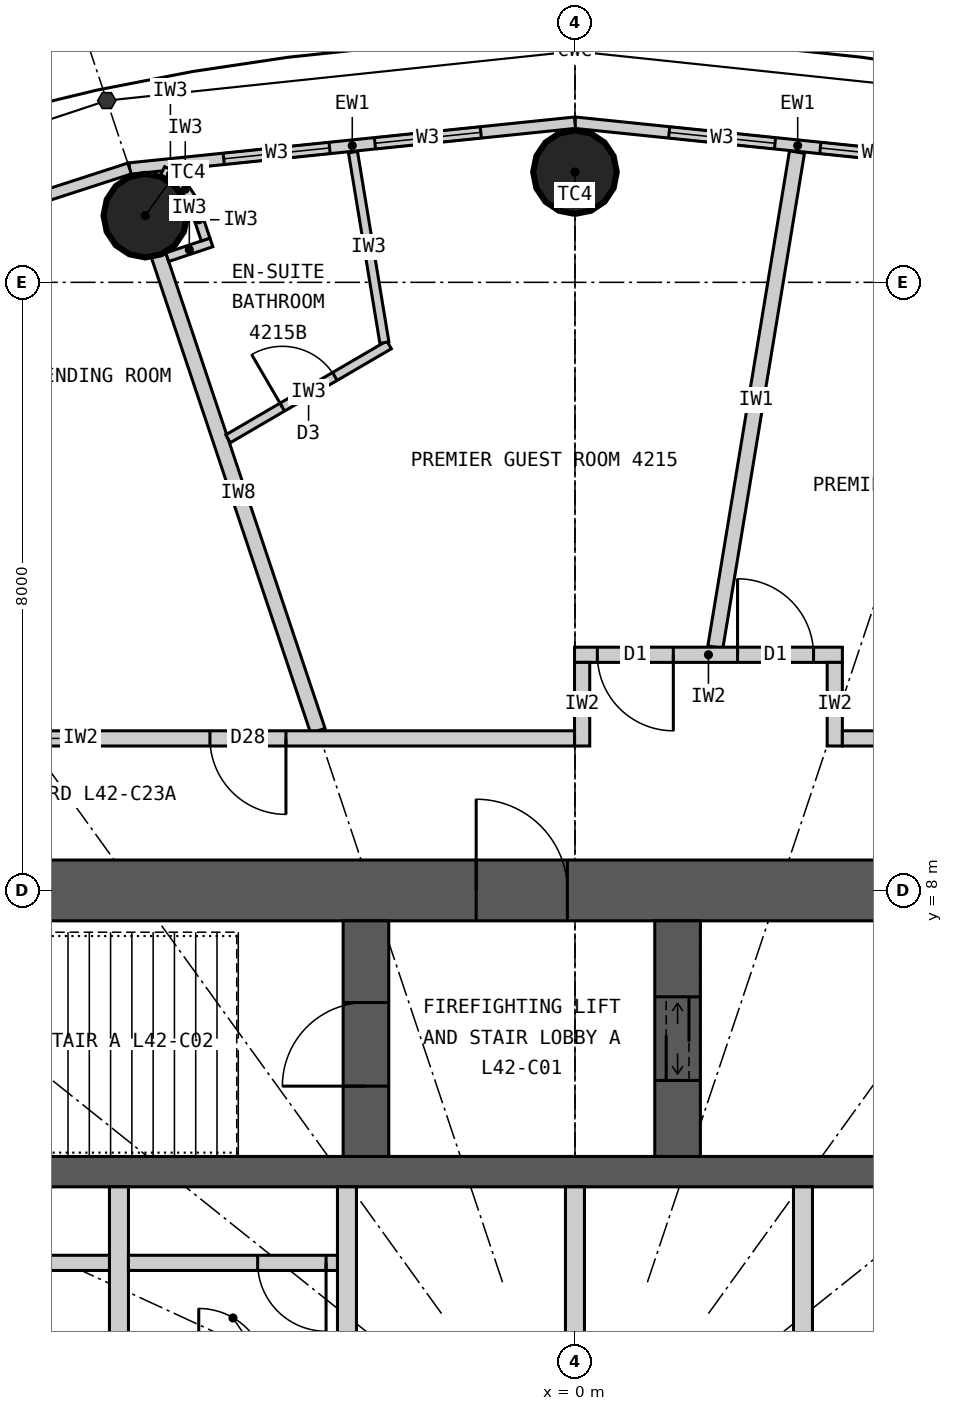
"""IFC4 building model, lengths in metres.
Left out: names, types, materials, properties, quantities, classifications, styles, units other than length and angle.
Written with IfcOpenShell. Run it as: python <this file> out.ifc"""

import sys

from ifc_helpers import new_model, si_unit, direction, frame, frame_2d, origin, origin_2d, place, context, subcontext, project, spatial, rectangle, circle, extrude, element, fill, save


model = new_model("IFC4")
c1 = context("Model", 3, precision=1e-05, world=origin(), true_north=direction((0.0, 1.0)))
c2 = subcontext(c1, "Body", "Model", "MODEL_VIEW")
j1 = project(units=[si_unit("LENGTHUNIT", "METRE"), si_unit("PLANEANGLEUNIT", "RADIAN")], contexts=[c1])
p1 = place(None, origin())
s1 = spatial("IfcSite", under=j1, at=p1, CompositionType="ELEMENT")
p2 = place(p1, origin())
s2 = spatial("IfcBuilding", under=s1, at=p2, CompositionType="ELEMENT")
p3 = place(p2, frame((0.0, 0.0, 159.9)))
s3 = spatial("IfcBuildingStorey", under=s2, at=p3, CompositionType="ELEMENT", Elevation=159.9)
for number, where, z_axis, x_axis in (
    (1, (0.0, 17.45, 0.0), (0.0, 0.0, 1.0), (1.0, 0.0, 0.0)),
    (2, (-5.653, 16.877, 0.0), (0.0, 0.0, 1.0), (1.0, 0.0, 0.0)),
):
    element("IfcColumn", number, at=place(p3, frame(where, z_axis=z_axis, x_axis=x_axis)), inside=s3, PredefinedType="COLUMN", context=c2, shape_type="SweptSolid", body=[
        extrude(circle(Radius=0.55, at=origin_2d()), origin(), (0.0, 0.0, 1.0), 3.3),
    ])
p4 = place(p3, frame((-12.4, 8.0, 0.0), z_axis=(0.0, 0.0, 1.0), x_axis=(1.0, 0.0, 0.0)))
e3 = element("IfcWall", 3, at=p4, inside=s3, PredefinedType="SHEAR", context=c2, shape_type="SweptSolid", body=[
    extrude(rectangle(XDim=24.8, YDim=0.8, at=frame_2d((12.4, 0.0))), origin(), (0.0, 0.0, 1.0), 3.3),
])
p5 = place(p4, frame((11.1, 0.0, 0.0)))
e4 = element("IfcOpeningElement", 4, at=p5, cuts=e3, PredefinedType="OPENING", context=c2, shape_type="SweptSolid", body=[
    extrude(rectangle(XDim=1.2, YDim=2.2, at=frame_2d((0.6, 1.1))), frame((0.0, 0.41, 0.0), z_axis=(0.0, -1.0, 0.0), x_axis=(1.0, 0.0, 0.0)), (0.0, 0.0, 1.0), 0.82),
])
p6 = place(p4, frame((18.7, 0.0, 0.0)))
e5 = element("IfcOpeningElement", 5, at=p6, cuts=e3, PredefinedType="OPENING", context=c2, shape_type="SweptSolid", body=[
    extrude(rectangle(XDim=0.9, YDim=2.2, at=frame_2d((0.45, 1.1))), frame((0.0, 0.41, 0.0), z_axis=(0.0, -1.0, 0.0), x_axis=(1.0, 0.0, 0.0)), (0.0, 0.0, 1.0), 0.82),
])
p7 = place(p3, frame((-11.6, 4.3, 0.0), z_axis=(0.0, 0.0, 1.0), x_axis=(1.0, 0.0, 0.0)))
e6 = element("IfcWall", 6, at=p7, inside=s3, PredefinedType="SHEAR", context=c2, shape_type="SweptSolid", body=[
    extrude(rectangle(XDim=23.2, YDim=0.4, at=frame_2d((11.6, 0.0))), origin(), (0.0, 0.0, 1.0), 3.3),
])
p8 = place(p3, frame((-2.75, 4.5, 0.0), z_axis=(0.0, 0.0, 1.0), x_axis=(0.0, 1.0, 0.0)))
e7 = element("IfcWall", 7, at=p8, inside=s3, PredefinedType="SHEAR", context=c2, shape_type="SweptSolid", body=[
    extrude(rectangle(XDim=3.1, YDim=0.6, at=frame_2d((1.55, 0.0))), origin(), (0.0, 0.0, 1.0), 3.3),
])
p9 = place(p8, frame((0.925, 0.0, 0.0)))
e8 = element("IfcOpeningElement", 8, at=p9, cuts=e7, PredefinedType="OPENING", context=c2, shape_type="SweptSolid", body=[
    extrude(rectangle(XDim=1.1, YDim=2.2, at=frame_2d((0.55, 1.1))), frame((0.0, 0.31, 0.0), z_axis=(0.0, -1.0, 0.0), x_axis=(1.0, 0.0, 0.0)), (0.0, 0.0, 1.0), 0.62),
])
p10 = place(p3, frame((1.35, 4.5, 0.0), z_axis=(0.0, 0.0, 1.0), x_axis=(0.0, 1.0, 0.0)))
e9 = element("IfcWall", 9, at=p10, inside=s3, PredefinedType="SHEAR", context=c2, shape_type="SweptSolid", body=[
    extrude(rectangle(XDim=3.1, YDim=0.6, at=frame_2d((1.55, 0.0))), origin(), (0.0, 0.0, 1.0), 3.3),
])
p11 = place(p10, frame((1.0, 0.0, 0.0)))
e10 = element("IfcOpeningElement", 10, at=p11, cuts=e9, PredefinedType="OPENING", context=c2, shape_type="SweptSolid", body=[
    extrude(rectangle(XDim=1.1, YDim=2.2, at=frame_2d((0.55, 1.1))), frame((0.0, 0.31, 0.0), z_axis=(0.0, -1.0, 0.0), x_axis=(1.0, 0.0, 0.0)), (0.0, 0.0, 1.0), 0.62),
])
for number, where, z_axis, x_axis in (
    (11, (-6.0, 1.75, 0.0), (0.0, 0.0, 1.0), (0.0, 1.0, 0.0)),
    (12, (-3.0, 1.75, 0.0), (0.0, 0.0, 1.0), (0.0, 1.0, 0.0)),
    (13, (0.0, 1.75, 0.0), (0.0, 0.0, 1.0), (0.0, 1.0, 0.0)),
    (14, (3.0, 1.75, 0.0), (0.0, 0.0, 1.0), (0.0, 1.0, 0.0)),
):
    element("IfcWall", number, at=place(p3, frame(where, z_axis=z_axis, x_axis=x_axis)), inside=s3, PredefinedType="PARTITIONING", context=c2, shape_type="SweptSolid", body=[
        extrude(rectangle(XDim=2.35, YDim=0.25, at=frame_2d((1.175, 0.0))), origin(), (0.0, 0.0, 1.0), 3.3),
    ])
p12 = place(p3, frame((5.86, 17.497, 0.0), z_axis=(0.0, 0.0, 1.0), x_axis=(-0.994751738032, 0.102318032045, 0.0)))
e15 = element("IfcWall", 15, at=p12, inside=s3, PredefinedType="ELEMENTEDWALL", context=c2, shape_type="SweptSolid", body=[
    extrude(rectangle(XDim=5.891, YDim=0.15, at=frame_2d((2.946, 0.0))), origin(), (0.0, 0.0, 1.0), 3.12),
])
p13 = place(p12, frame((1.246, 0.0, 0.9)))
e16 = element("IfcOpeningElement", 16, at=p13, cuts=e15, PredefinedType="OPENING", context=c2, shape_type="SweptSolid", body=[
    extrude(rectangle(XDim=1.4, YDim=1.9, at=frame_2d((0.7, 0.95))), frame((0.0, 0.085, 0.0), z_axis=(0.0, -1.0, 0.0), x_axis=(1.0, 0.0, 0.0)), (0.0, 0.0, 1.0), 0.17),
])
p14 = place(p12, frame((3.246, 0.0, 0.9)))
e17 = element("IfcOpeningElement", 17, at=p14, cuts=e15, PredefinedType="OPENING", context=c2, shape_type="SweptSolid", body=[
    extrude(rectangle(XDim=1.4, YDim=1.9, at=frame_2d((0.7, 0.95))), frame((0.0, 0.085, 0.0), z_axis=(0.0, -1.0, 0.0), x_axis=(1.0, 0.0, 0.0)), (0.0, 0.0, 1.0), 0.17),
])
p15 = place(p3, frame((0.0, 18.1, 0.0), z_axis=(0.0, 0.0, 1.0), x_axis=(-0.994751738032, -0.102318032045, 0.0)))
e18 = element("IfcWall", 18, at=p15, inside=s3, PredefinedType="ELEMENTEDWALL", context=c2, shape_type="SweptSolid", body=[
    extrude(rectangle(XDim=5.891, YDim=0.15, at=frame_2d((2.946, 0.0))), origin(), (0.0, 0.0, 1.0), 3.12),
])
p16 = place(p15, frame((1.246, 0.0, 0.9)))
e19 = element("IfcOpeningElement", 19, at=p16, cuts=e18, PredefinedType="OPENING", context=c2, shape_type="SweptSolid", body=[
    extrude(rectangle(XDim=1.4, YDim=1.9, at=frame_2d((0.7, 0.95))), frame((0.0, 0.085, 0.0), z_axis=(0.0, -1.0, 0.0), x_axis=(1.0, 0.0, 0.0)), (0.0, 0.0, 1.0), 0.17),
])
p17 = place(p15, frame((3.246, 0.0, 0.9)))
e20 = element("IfcOpeningElement", 20, at=p17, cuts=e18, PredefinedType="OPENING", context=c2, shape_type="SweptSolid", body=[
    extrude(rectangle(XDim=1.4, YDim=1.9, at=frame_2d((0.7, 0.95))), frame((0.0, 0.085, 0.0), z_axis=(0.0, -1.0, 0.0), x_axis=(1.0, 0.0, 0.0)), (0.0, 0.0, 1.0), 0.17),
])
p18 = place(p3, frame((-5.86, 17.497, 0.0), z_axis=(0.0, 0.0, 1.0), x_axis=(-0.951432482129, -0.307857486429, 0.0)))
e21 = element("IfcWall", 21, at=p18, inside=s3, PredefinedType="ELEMENTEDWALL", context=c2, shape_type="SweptSolid", body=[
    extrude(rectangle(XDim=5.766, YDim=0.15, at=frame_2d((2.883, 0.0))), origin(), (0.0, 0.0, 1.0), 3.12),
])
p19 = place(p18, frame((1.183, 0.0, 0.9)))
e22 = element("IfcOpeningElement", 22, at=p19, cuts=e21, PredefinedType="OPENING", context=c2, shape_type="SweptSolid", body=[
    extrude(rectangle(XDim=1.4, YDim=1.9, at=frame_2d((0.7, 0.95))), frame((0.0, 0.085, 0.0), z_axis=(0.0, -1.0, 0.0), x_axis=(1.0, 0.0, 0.0)), (0.0, 0.0, 1.0), 0.17),
])
p20 = place(p18, frame((3.183, 0.0, 0.9)))
e23 = element("IfcOpeningElement", 23, at=p20, cuts=e21, PredefinedType="OPENING", context=c2, shape_type="SweptSolid", body=[
    extrude(rectangle(XDim=1.4, YDim=1.9, at=frame_2d((0.7, 0.95))), frame((0.0, 0.085, 0.0), z_axis=(0.0, -1.0, 0.0), x_axis=(1.0, 0.0, 0.0)), (0.0, 0.0, 1.0), 0.17),
])
p21 = place(p3, frame((1.847, 11.2, 0.0), z_axis=(0.0, 0.0, 1.0), x_axis=(0.162695449404, 0.986676335352, 0.0)))
e24 = element("IfcWall", 24, at=p21, inside=s3, PredefinedType="PARTITIONING", context=c2, shape_type="SweptSolid", body=[
    extrude(rectangle(XDim=6.601, YDim=0.2, at=frame_2d((3.301, 0.0))), origin(), (0.0, 0.0, 1.0), 3.12),
])
p22 = place(p3, frame((-3.383, 10.1, 0.0), z_axis=(0.0, 0.0, 1.0), x_axis=(-0.317615120474, 0.948219718866, 0.0)))
e25 = element("IfcWall", 25, at=p22, inside=s3, PredefinedType="PARTITIONING", context=c2, shape_type="SweptSolid", body=[
    extrude(rectangle(XDim=6.597, YDim=0.2, at=frame_2d((3.299, 0.0))), origin(), (0.0, 0.0, 1.0), 2.42),
])
p23 = place(p3, frame((-0.006, 11.1, 0.0), z_axis=(0.0, 0.0, 1.0), x_axis=(1.0, 0.0, 0.0)))
e26 = element("IfcWall", 26, at=p23, inside=s3, PredefinedType="PARTITIONING", context=c2, shape_type="SweptSolid", body=[
    extrude(rectangle(XDim=3.524, YDim=0.2, at=frame_2d((1.762, 0.0))), origin(), (0.0, 0.0, 1.0), 3.12),
])
p24 = place(p23, frame((2.145, 0.0, 0.0)))
e27 = element("IfcOpeningElement", 27, at=p24, cuts=e26, PredefinedType="OPENING", context=c2, shape_type="SweptSolid", body=[
    extrude(rectangle(XDim=1.0, YDim=2.2, at=frame_2d((0.5, 1.1))), frame((0.0, 0.11, 0.0), z_axis=(0.0, -1.0, 0.0), x_axis=(1.0, 0.0, 0.0)), (0.0, 0.0, 1.0), 0.22),
])
p25 = place(p23, frame((0.3, 0.0, 0.0)))
e28 = element("IfcOpeningElement", 28, at=p25, cuts=e26, PredefinedType="OPENING", context=c2, shape_type="SweptSolid", body=[
    extrude(rectangle(XDim=1.0, YDim=2.2, at=frame_2d((0.5, 1.1))), frame((0.0, 0.11, 0.0), z_axis=(0.0, -1.0, 0.0), x_axis=(1.0, 0.0, 0.0)), (0.0, 0.0, 1.0), 0.22),
])
p26 = place(p3, frame((0.094, 9.9, 0.0), z_axis=(0.0, 0.0, 1.0), x_axis=(0.0, 1.0, 0.0)))
e29 = element("IfcWall", 29, at=p26, inside=s3, PredefinedType="PARTITIONING", context=c2, shape_type="SweptSolid", body=[
    extrude(rectangle(XDim=1.1, YDim=0.2, at=frame_2d((0.55, 0.0))), origin(), (0.0, 0.0, 1.0), 2.42),
])
p27 = place(p3, frame((3.418, 9.9, 0.0), z_axis=(0.0, 0.0, 1.0), x_axis=(0.0, 1.0, 0.0)))
e30 = element("IfcWall", 30, at=p27, inside=s3, PredefinedType="PARTITIONING", context=c2, shape_type="SweptSolid", body=[
    extrude(rectangle(XDim=1.1, YDim=0.2, at=frame_2d((0.55, 0.0))), origin(), (0.0, 0.0, 1.0), 3.12),
])
p28 = place(p3, frame((-4.564, 13.942, 0.0), z_axis=(0.0, 0.0, 1.0), x_axis=(0.863717519451, 0.503976236139, 0.0)))
e31 = element("IfcWall", 31, at=p28, inside=s3, PredefinedType="PARTITIONING", context=c2, shape_type="SweptSolid", body=[
    extrude(rectangle(XDim=2.453, YDim=0.12, at=frame_2d((1.226, 0.0))), origin(), (0.0, 0.0, 1.0), 3.12),
])
p29 = place(p28, frame((0.826, 0.0, 0.0)))
e32 = element("IfcOpeningElement", 32, at=p29, cuts=e31, PredefinedType="OPENING", context=c2, shape_type="SweptSolid", body=[
    extrude(rectangle(XDim=0.8, YDim=2.1, at=frame_2d((0.4, 1.05))), frame((0.0, 0.07, 0.0), z_axis=(0.0, -1.0, 0.0), x_axis=(1.0, 0.0, 0.0)), (0.0, 0.0, 1.0), 0.14),
])
p30 = place(p3, frame((-2.508, 15.207, 0.0), z_axis=(0.0, 0.0, 1.0), x_axis=(-0.162637365963, 0.986685911115, 0.0)))
e33 = element("IfcWall", 33, at=p30, inside=s3, PredefinedType="PARTITIONING", context=c2, shape_type="SweptSolid", body=[
    extrude(rectangle(XDim=2.54, YDim=0.12, at=frame_2d((1.27, 0.0))), origin(), (0.0, 0.0, 1.0), 3.12),
])
p31 = place(p3, frame((-5.364, 16.331, 0.0), z_axis=(0.0, 0.0, 1.0), x_axis=(0.948283770087, 0.317423835572, 0.0)))
e34 = element("IfcWall", 34, at=p31, inside=s3, PredefinedType="PARTITIONING", context=c2, shape_type="SweptSolid", body=[
    extrude(rectangle(XDim=0.612, YDim=0.12, at=frame_2d((0.306, 0.0))), origin(), (0.0, 0.0, 1.0), 3.12),
])
p32 = place(p3, frame((-4.86, 16.563, 0.0), z_axis=(0.0, 0.0, 1.0), x_axis=(-0.317825321803, 0.948149284038, 0.0)))
e35 = element("IfcWall", 35, at=p32, inside=s3, PredefinedType="PARTITIONING", context=c2, shape_type="SweptSolid", body=[
    extrude(rectangle(XDim=0.55, YDim=0.12, at=frame_2d((0.275, 0.0))), origin(), (0.0, 0.0, 1.0), 3.12),
])
p33 = place(p3, frame((-5.034, 17.084, 0.0), z_axis=(0.0, 0.0, 1.0), x_axis=(-0.552362205726, 0.833604218851, 0.0)))
e36 = element("IfcWall", 36, at=p33, inside=s3, PredefinedType="PARTITIONING", context=c2, shape_type="SweptSolid", body=[
    extrude(rectangle(XDim=0.338, YDim=0.12, at=frame_2d((0.169, 0.0))), origin(), (0.0, 0.0, 1.0), 3.12),
])
p34 = place(p3, frame((-5.221, 17.366, 0.0), z_axis=(0.0, 0.0, 1.0), x_axis=(-0.895067896179, 0.445929883759, 0.0)))
e37 = element("IfcWall", 37, at=p34, inside=s3, PredefinedType="PARTITIONING", context=c2, shape_type="SweptSolid", body=[
    extrude(rectangle(XDim=0.228, YDim=0.12, at=frame_2d((0.114, 0.0))), origin(), (0.0, 0.0, 1.0), 3.12),
])
p35 = place(p3, frame((-14.1, 10.0, 0.0), z_axis=(0.0, 0.0, 1.0), x_axis=(1.0, 0.0, 0.0)))
e38 = element("IfcWall", 38, at=p35, inside=s3, PredefinedType="PARTITIONING", context=c2, shape_type="SweptSolid", body=[
    extrude(rectangle(XDim=14.094, YDim=0.2, at=frame_2d((7.047, 0.0))), origin(), (0.0, 0.0, 1.0), 3.12),
])
p36 = place(p35, frame((1.895, 0.0, 0.0)))
e39 = element("IfcOpeningElement", 39, at=p36, cuts=e38, PredefinedType="OPENING", context=c2, shape_type="SweptSolid", body=[
    extrude(rectangle(XDim=1.0, YDim=2.2, at=frame_2d((0.5, 1.1))), frame((0.0, 0.11, 0.0), z_axis=(0.0, -1.0, 0.0), x_axis=(1.0, 0.0, 0.0)), (0.0, 0.0, 1.0), 0.22),
])
p37 = place(p35, frame((9.297, 0.0, 0.0)))
e40 = element("IfcOpeningElement", 40, at=p37, cuts=e38, PredefinedType="OPENING", context=c2, shape_type="SweptSolid", body=[
    extrude(rectangle(XDim=1.0, YDim=2.2, at=frame_2d((0.5, 1.1))), frame((0.0, 0.11, 0.0), z_axis=(0.0, -1.0, 0.0), x_axis=(1.0, 0.0, 0.0)), (0.0, 0.0, 1.0), 0.22),
])
p38 = place(p3, frame((3.518, 10.0, 0.0), z_axis=(0.0, 0.0, 1.0), x_axis=(1.0, 0.0, 0.0)))
e41 = element("IfcWall", 41, at=p38, inside=s3, PredefinedType="PARTITIONING", context=c2, shape_type="SweptSolid", body=[
    extrude(rectangle(XDim=10.582, YDim=0.2, at=frame_2d((5.291, 0.0))), origin(), (0.0, 0.0, 1.0), 3.12),
])
p39 = place(p38, frame((4.621, 0.0, 0.0)))
e42 = element("IfcOpeningElement", 42, at=p39, cuts=e41, PredefinedType="OPENING", context=c2, shape_type="SweptSolid", body=[
    extrude(rectangle(XDim=1.0, YDim=2.2, at=frame_2d((0.5, 1.1))), frame((0.0, 0.11, 0.0), z_axis=(0.0, -1.0, 0.0), x_axis=(1.0, 0.0, 0.0)), (0.0, 0.0, 1.0), 0.22),
])
p40 = place(p3, frame((-8.8, 3.1, 0.0), z_axis=(0.0, 0.0, 1.0), x_axis=(1.0, 0.0, 0.0)))
e43 = element("IfcWall", 43, at=p40, inside=s3, PredefinedType="PARTITIONING", context=c2, shape_type="SweptSolid", body=[
    extrude(rectangle(XDim=2.675, YDim=0.2, at=frame_2d((1.337, 0.0))), origin(), (0.0, 0.0, 1.0), 3.12),
])
p41 = place(p40, frame((0.15, 0.0, 0.0)))
e44 = element("IfcOpeningElement", 44, at=p41, cuts=e43, PredefinedType="OPENING", context=c2, shape_type="SweptSolid", body=[
    extrude(rectangle(XDim=0.9, YDim=2.2, at=frame_2d((0.45, 1.1))), frame((0.0, 0.11, 0.0), z_axis=(0.0, -1.0, 0.0), x_axis=(1.0, 0.0, 0.0)), (0.0, 0.0, 1.0), 0.22),
])
p42 = place(p3, frame((-5.875, 3.1, 0.0), z_axis=(0.0, 0.0, 1.0), x_axis=(1.0, 0.0, 0.0)))
e45 = element("IfcWall", 45, at=p42, inside=s3, PredefinedType="PARTITIONING", context=c2, shape_type="SweptSolid", body=[
    extrude(rectangle(XDim=2.75, YDim=0.2, at=frame_2d((1.375, 0.0))), origin(), (0.0, 0.0, 1.0), 3.12),
])
p43 = place(p42, frame((1.7, 0.0, 0.0)))
e46 = element("IfcOpeningElement", 46, at=p43, cuts=e45, PredefinedType="OPENING", context=c2, shape_type="SweptSolid", body=[
    extrude(rectangle(XDim=0.9, YDim=2.2, at=frame_2d((0.45, 1.1))), frame((0.0, 0.11, 0.0), z_axis=(0.0, -1.0, 0.0), x_axis=(1.0, 0.0, 0.0)), (0.0, 0.0, 1.0), 0.22),
])
p44 = place(p13, origin())
e47 = element("IfcWindow", 47, at=p44, inside=s3, PartitioningType="SINGLE_PANEL", PredefinedType="WINDOW", context=c2, shape_type="SweptSolid", body=[
    extrude(rectangle(XDim=1.4, YDim=1.9, at=frame_2d((0.7, 0.95))), frame((0.0, 0.03, 0.0), z_axis=(0.0, -1.0, 0.0), x_axis=(1.0, 0.0, 0.0)), (0.0, 0.0, 1.0), 0.06),
])
fill(e16, e47)
p45 = place(p14, origin())
e48 = element("IfcWindow", 48, at=p45, inside=s3, PartitioningType="SINGLE_PANEL", PredefinedType="WINDOW", context=c2, shape_type="SweptSolid", body=[
    extrude(rectangle(XDim=1.4, YDim=1.9, at=frame_2d((0.7, 0.95))), frame((0.0, 0.03, 0.0), z_axis=(0.0, -1.0, 0.0), x_axis=(1.0, 0.0, 0.0)), (0.0, 0.0, 1.0), 0.06),
])
fill(e17, e48)
p46 = place(p16, origin())
e49 = element("IfcWindow", 49, at=p46, inside=s3, PartitioningType="SINGLE_PANEL", PredefinedType="WINDOW", context=c2, shape_type="SweptSolid", body=[
    extrude(rectangle(XDim=1.4, YDim=1.9, at=frame_2d((0.7, 0.95))), frame((0.0, 0.03, 0.0), z_axis=(0.0, -1.0, 0.0), x_axis=(1.0, 0.0, 0.0)), (0.0, 0.0, 1.0), 0.06),
])
fill(e19, e49)
p47 = place(p17, origin())
e50 = element("IfcWindow", 50, at=p47, inside=s3, PartitioningType="SINGLE_PANEL", PredefinedType="WINDOW", context=c2, shape_type="SweptSolid", body=[
    extrude(rectangle(XDim=1.4, YDim=1.9, at=frame_2d((0.7, 0.95))), frame((0.0, 0.03, 0.0), z_axis=(0.0, -1.0, 0.0), x_axis=(1.0, 0.0, 0.0)), (0.0, 0.0, 1.0), 0.06),
])
fill(e20, e50)
p48 = place(p24, origin())
e51 = element("IfcDoor", 51, at=p48, inside=s3, OperationType="SINGLE_SWING_LEFT", PredefinedType="DOOR", context=c2, shape_type="SweptSolid", body=[
    extrude(rectangle(XDim=1.0, YDim=2.2, at=frame_2d((0.5, 1.1))), frame((0.0, 0.025, 0.0), z_axis=(0.0, -1.0, 0.0), x_axis=(1.0, 0.0, 0.0)), (0.0, 0.0, 1.0), 0.05),
])
fill(e27, e51)
p49 = place(p29, origin())
e52 = element("IfcDoor", 52, at=p49, inside=s3, OperationType="SINGLE_SWING_LEFT", PredefinedType="DOOR", context=c2, shape_type="SweptSolid", body=[
    extrude(rectangle(XDim=0.8, YDim=2.1, at=frame_2d((0.4, 1.05))), frame((0.0, 0.025, 0.0), z_axis=(0.0, -1.0, 0.0), x_axis=(1.0, 0.0, 0.0)), (0.0, 0.0, 1.0), 0.05),
])
fill(e32, e52)
p50 = place(p25, origin())
e53 = element("IfcDoor", 53, at=p50, inside=s3, OperationType="SINGLE_SWING_RIGHT", PredefinedType="DOOR", context=c2, shape_type="SweptSolid", body=[
    extrude(rectangle(XDim=1.0, YDim=2.2, at=frame_2d((0.5, 1.1))), frame((0.0, 0.025, 0.0), z_axis=(0.0, -1.0, 0.0), x_axis=(1.0, 0.0, 0.0)), (0.0, 0.0, 1.0), 0.05),
])
fill(e28, e53)
p51 = place(p37, origin())
e54 = element("IfcDoor", 54, at=p51, inside=s3, OperationType="SINGLE_SWING_RIGHT", PredefinedType="DOOR", context=c2, shape_type="SweptSolid", body=[
    extrude(rectangle(XDim=1.0, YDim=2.2, at=frame_2d((0.5, 1.1))), frame((0.0, 0.025, 0.0), z_axis=(0.0, -1.0, 0.0), x_axis=(1.0, 0.0, 0.0)), (0.0, 0.0, 1.0), 0.05),
])
fill(e40, e54)
p52 = place(p5, origin())
e55 = element("IfcDoor", 55, at=p52, inside=s3, OperationType="SINGLE_SWING_LEFT", PredefinedType="DOOR", context=c2, shape_type="SweptSolid", body=[
    extrude(rectangle(XDim=1.2, YDim=2.2, at=frame_2d((0.6, 1.1))), frame((0.0, 0.025, 0.0), z_axis=(0.0, -1.0, 0.0), x_axis=(1.0, 0.0, 0.0)), (0.0, 0.0, 1.0), 0.05),
])
fill(e4, e55)
p53 = place(p9, origin())
e56 = element("IfcDoor", 56, at=p53, inside=s3, OperationType="SINGLE_SWING_LEFT", PredefinedType="DOOR", context=c2, shape_type="SweptSolid", body=[
    extrude(rectangle(XDim=1.1, YDim=2.2, at=frame_2d((0.55, 1.1))), frame((0.0, 0.025, 0.0), z_axis=(0.0, -1.0, 0.0), x_axis=(1.0, 0.0, 0.0)), (0.0, 0.0, 1.0), 0.05),
])
fill(e8, e56)
p54 = place(p11, origin())
e57 = element("IfcDoor", 57, at=p54, inside=s3, OperationType="DOUBLE_DOOR_SLIDING", PredefinedType="DOOR", context=c2, shape_type="SweptSolid", body=[
    extrude(rectangle(XDim=1.1, YDim=2.2, at=frame_2d((0.55, 1.1))), frame((0.0, 0.025, 0.0), z_axis=(0.0, -1.0, 0.0), x_axis=(1.0, 0.0, 0.0)), (0.0, 0.0, 1.0), 0.05),
])
fill(e10, e57)
p55 = place(p43, origin())
e58 = element("IfcDoor", 58, at=p55, inside=s3, OperationType="SINGLE_SWING_RIGHT", PredefinedType="DOOR", context=c2, shape_type="SweptSolid", body=[
    extrude(rectangle(XDim=0.9, YDim=2.2, at=frame_2d((0.45, 1.1))), frame((0.0, 0.025, 0.0), z_axis=(0.0, -1.0, 0.0), x_axis=(1.0, 0.0, 0.0)), (0.0, 0.0, 1.0), 0.05),
])
fill(e46, e58)
save(model, sys.argv[1])
